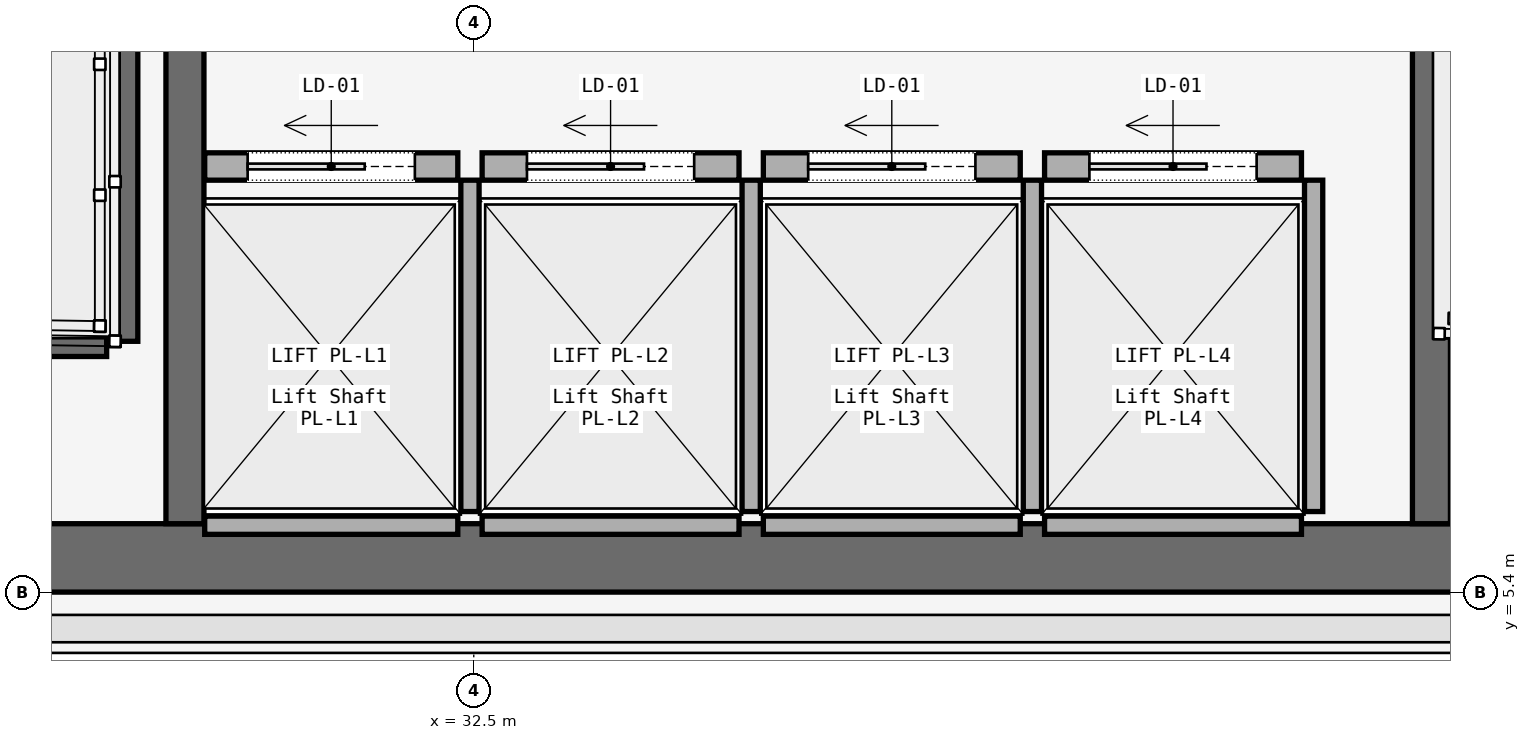
"""IFC4 building model, lengths in metres.
Left out: names, types, materials, properties, quantities, classifications, styles, units other than length and angle.
Written with IfcOpenShell. Run it as: python <this file> out.ifc"""

import sys

from ifc_helpers import new_model, si_unit, direction, frame, frame_2d, origin, place, context, subcontext, project, spatial, rectangle, extrude, element, fill, save


model = new_model("IFC4")
c1 = context("Model", 3, precision=1e-05, world=origin(), true_north=direction((0.0, 1.0)))
c2 = subcontext(c1, "Body", "Model", "MODEL_VIEW")
j1 = project(units=[si_unit("LENGTHUNIT", "METRE"), si_unit("PLANEANGLEUNIT", "RADIAN")], contexts=[c1])
p1 = place(None, origin())
s1 = spatial("IfcSite", under=j1, at=p1, CompositionType="ELEMENT")
p2 = place(p1, origin())
s2 = spatial("IfcBuilding", under=s1, at=p2, CompositionType="ELEMENT")
p3 = place(p2, frame((0.0, 0.0, 36.0)))
s3 = spatial("IfcBuildingStorey", under=s2, at=p3, CompositionType="ELEMENT", Elevation=36.0)
p4 = place(p3, frame((26.45, 5.625, 0.0), z_axis=(0.0, 0.0, 1.0), x_axis=(1.0, 0.0, 0.0)))
e1 = element("IfcWall", 1, at=p4, inside=s3, PredefinedType="SOLIDWALL", context=c2, shape_type="SweptSolid", body=[
    extrude(rectangle(XDim=31.1, YDim=0.45, at=frame_2d((15.55, 0.0))), origin(), (0.0, 0.0, 1.0), 3.58),
])
for number, where, z_axis, x_axis in (
    (2, (30.6, 5.85, 0.0), (0.0, 0.0, 1.0), (0.0, 1.0, 0.0)),
    (3, (38.8, 5.85, 0.0), (0.0, 0.0, 1.0), (0.0, 1.0, 0.0)),
):
    element("IfcWall", number, at=place(p3, frame(where, z_axis=z_axis, x_axis=x_axis)), inside=s3, PredefinedType="SOLIDWALL", context=c2, shape_type="SweptSolid", body=[
        extrude(rectangle(XDim=8.9, YDim=0.25, at=frame_2d((4.45, 0.0))), origin(), (0.0, 0.0, 1.0), 3.58),
    ])
p5 = place(p3, frame((30.19, 14.7, 0.0), z_axis=(0.0, 0.0, 1.0), x_axis=(0.0, -1.0, 0.0)))
e4 = element("IfcWall", 4, at=p5, inside=s3, PredefinedType="SOLIDWALL", context=c2, shape_type="SweptSolid", body=[
    extrude(rectangle(XDim=7.65, YDim=0.2, at=frame_2d((3.825, 0.0))), origin(), (0.0, 0.0, 1.0), 3.8),
])
p6 = place(p3, frame((26.97, 7.05, 0.0), z_axis=(0.0, 0.0, 1.0), x_axis=(1.0, 0.0, 0.0)))
e5 = element("IfcWall", 5, at=p6, inside=s3, PredefinedType="SOLIDWALL", context=c2, shape_type="SweptSolid", body=[
    extrude(rectangle(XDim=3.115, YDim=0.2, at=frame_2d((1.558, 0.0))), origin(), (0.0, 0.0, 1.0), 3.8),
])
p7 = place(p3, frame((30.73, 8.2, 0.0), z_axis=(0.0, 0.0, 1.0), x_axis=(1.0, 0.0, 0.0)))
e6 = element("IfcWall", 6, at=p7, inside=s3, PredefinedType="SOLIDWALL", context=c2, shape_type="SweptSolid", body=[
    extrude(rectangle(XDim=1.665, YDim=0.18, at=frame_2d((0.833, 0.0))), origin(), (0.0, 0.0, 1.0), 2.933),
])
p8 = place(p7, frame((0.282, 0.0, 0.0)))
e7 = element("IfcOpeningElement", 7, at=p8, cuts=e6, PredefinedType="OPENING", context=c2, shape_type="SweptSolid", body=[
    extrude(rectangle(XDim=1.1, YDim=2.2, at=frame_2d((0.55, 1.1))), frame((0.0, 0.09, 0.0), z_axis=(0.0, -1.0, 0.0), x_axis=(1.0, 0.0, 0.0)), (0.0, 0.0, 1.0), 0.18),
])
p9 = place(p3, frame((30.73, 5.84, 0.0), z_axis=(0.0, 0.0, 1.0), x_axis=(1.0, 0.0, 0.0)))
e8 = element("IfcWall", 8, at=p9, inside=s3, PredefinedType="SOLIDWALL", context=c2, shape_type="SweptSolid", body=[
    extrude(rectangle(XDim=1.665, YDim=0.12, at=frame_2d((0.833, 0.0))), origin(), (0.0, 0.0, 1.0), 2.933),
])
p10 = place(p3, frame((32.475, 5.93, 0.0), z_axis=(0.0, 0.0, 1.0), x_axis=(0.0, 1.0, 0.0)))
e9 = element("IfcWall", 9, at=p10, inside=s3, PredefinedType="SOLIDWALL", context=c2, shape_type="SweptSolid", body=[
    extrude(rectangle(XDim=2.18, YDim=0.12, at=frame_2d((1.09, 0.0))), origin(), (0.0, 0.0, 1.0), 2.933),
])
p11 = place(p3, frame((32.555, 8.2, 0.0), z_axis=(0.0, 0.0, 1.0), x_axis=(1.0, 0.0, 0.0)))
e10 = element("IfcWall", 10, at=p11, inside=s3, PredefinedType="SOLIDWALL", context=c2, shape_type="SweptSolid", body=[
    extrude(rectangle(XDim=1.69, YDim=0.18, at=frame_2d((0.845, 0.0))), origin(), (0.0, 0.0, 1.0), 2.933),
])
p12 = place(p11, frame((0.295, 0.0, 0.0)))
e11 = element("IfcOpeningElement", 11, at=p12, cuts=e10, PredefinedType="OPENING", context=c2, shape_type="SweptSolid", body=[
    extrude(rectangle(XDim=1.1, YDim=2.2, at=frame_2d((0.55, 1.1))), frame((0.0, 0.09, 0.0), z_axis=(0.0, -1.0, 0.0), x_axis=(1.0, 0.0, 0.0)), (0.0, 0.0, 1.0), 0.18),
])
p13 = place(p3, frame((32.555, 5.84, 0.0), z_axis=(0.0, 0.0, 1.0), x_axis=(1.0, 0.0, 0.0)))
e12 = element("IfcWall", 12, at=p13, inside=s3, PredefinedType="SOLIDWALL", context=c2, shape_type="SweptSolid", body=[
    extrude(rectangle(XDim=1.69, YDim=0.12, at=frame_2d((0.845, 0.0))), origin(), (0.0, 0.0, 1.0), 2.933),
])
p14 = place(p3, frame((34.325, 5.93, 0.0), z_axis=(0.0, 0.0, 1.0), x_axis=(0.0, 1.0, 0.0)))
e13 = element("IfcWall", 13, at=p14, inside=s3, PredefinedType="SOLIDWALL", context=c2, shape_type="SweptSolid", body=[
    extrude(rectangle(XDim=2.18, YDim=0.12, at=frame_2d((1.09, 0.0))), origin(), (0.0, 0.0, 1.0), 2.933),
])
p15 = place(p3, frame((34.405, 8.2, 0.0), z_axis=(0.0, 0.0, 1.0), x_axis=(1.0, 0.0, 0.0)))
e14 = element("IfcWall", 14, at=p15, inside=s3, PredefinedType="SOLIDWALL", context=c2, shape_type="SweptSolid", body=[
    extrude(rectangle(XDim=1.69, YDim=0.18, at=frame_2d((0.845, 0.0))), origin(), (0.0, 0.0, 1.0), 2.933),
])
p16 = place(p15, frame((0.295, 0.0, 0.0)))
e15 = element("IfcOpeningElement", 15, at=p16, cuts=e14, PredefinedType="OPENING", context=c2, shape_type="SweptSolid", body=[
    extrude(rectangle(XDim=1.1, YDim=2.2, at=frame_2d((0.55, 1.1))), frame((0.0, 0.09, 0.0), z_axis=(0.0, -1.0, 0.0), x_axis=(1.0, 0.0, 0.0)), (0.0, 0.0, 1.0), 0.18),
])
p17 = place(p3, frame((34.405, 5.84, 0.0), z_axis=(0.0, 0.0, 1.0), x_axis=(1.0, 0.0, 0.0)))
e16 = element("IfcWall", 16, at=p17, inside=s3, PredefinedType="SOLIDWALL", context=c2, shape_type="SweptSolid", body=[
    extrude(rectangle(XDim=1.69, YDim=0.12, at=frame_2d((0.845, 0.0))), origin(), (0.0, 0.0, 1.0), 2.933),
])
p18 = place(p3, frame((36.175, 5.93, 0.0), z_axis=(0.0, 0.0, 1.0), x_axis=(0.0, 1.0, 0.0)))
e17 = element("IfcWall", 17, at=p18, inside=s3, PredefinedType="SOLIDWALL", context=c2, shape_type="SweptSolid", body=[
    extrude(rectangle(XDim=2.18, YDim=0.12, at=frame_2d((1.09, 0.0))), origin(), (0.0, 0.0, 1.0), 2.933),
])
p19 = place(p3, frame((36.255, 8.2, 0.0), z_axis=(0.0, 0.0, 1.0), x_axis=(1.0, 0.0, 0.0)))
e18 = element("IfcWall", 18, at=p19, inside=s3, PredefinedType="SOLIDWALL", context=c2, shape_type="SweptSolid", body=[
    extrude(rectangle(XDim=1.69, YDim=0.18, at=frame_2d((0.845, 0.0))), origin(), (0.0, 0.0, 1.0), 2.933),
])
p20 = place(p19, frame((0.295, 0.0, 0.0)))
e19 = element("IfcOpeningElement", 19, at=p20, cuts=e18, PredefinedType="OPENING", context=c2, shape_type="SweptSolid", body=[
    extrude(rectangle(XDim=1.1, YDim=2.2, at=frame_2d((0.55, 1.1))), frame((0.0, 0.09, 0.0), z_axis=(0.0, -1.0, 0.0), x_axis=(1.0, 0.0, 0.0)), (0.0, 0.0, 1.0), 0.18),
])
p21 = place(p3, frame((36.255, 5.84, 0.0), z_axis=(0.0, 0.0, 1.0), x_axis=(1.0, 0.0, 0.0)))
e20 = element("IfcWall", 20, at=p21, inside=s3, PredefinedType="SOLIDWALL", context=c2, shape_type="SweptSolid", body=[
    extrude(rectangle(XDim=1.69, YDim=0.12, at=frame_2d((0.845, 0.0))), origin(), (0.0, 0.0, 1.0), 2.933),
])
p22 = place(p3, frame((38.025, 5.93, 0.0), z_axis=(0.0, 0.0, 1.0), x_axis=(0.0, 1.0, 0.0)))
e21 = element("IfcWall", 21, at=p22, inside=s3, PredefinedType="SOLIDWALL", context=c2, shape_type="SweptSolid", body=[
    extrude(rectangle(XDim=2.18, YDim=0.12, at=frame_2d((1.09, 0.0))), origin(), (0.0, 0.0, 1.0), 2.933),
])
p23 = place(p8, origin())
e22 = element("IfcDoor", 22, at=p23, inside=s3, OperationType="SLIDING_TO_LEFT", PredefinedType="DOOR", context=c2, shape_type="SweptSolid", body=[
    extrude(rectangle(XDim=1.1, YDim=2.2, at=frame_2d((0.55, 1.1))), frame((0.0, 0.025, 0.0), z_axis=(0.0, -1.0, 0.0), x_axis=(1.0, 0.0, 0.0)), (0.0, 0.0, 1.0), 0.05),
])
fill(e7, e22)
p24 = place(p12, origin())
e23 = element("IfcDoor", 23, at=p24, inside=s3, OperationType="SLIDING_TO_LEFT", PredefinedType="DOOR", context=c2, shape_type="SweptSolid", body=[
    extrude(rectangle(XDim=1.1, YDim=2.2, at=frame_2d((0.55, 1.1))), frame((0.0, 0.025, 0.0), z_axis=(0.0, -1.0, 0.0), x_axis=(1.0, 0.0, 0.0)), (0.0, 0.0, 1.0), 0.05),
])
fill(e11, e23)
p25 = place(p16, origin())
e24 = element("IfcDoor", 24, at=p25, inside=s3, OperationType="SLIDING_TO_LEFT", PredefinedType="DOOR", context=c2, shape_type="SweptSolid", body=[
    extrude(rectangle(XDim=1.1, YDim=2.2, at=frame_2d((0.55, 1.1))), frame((0.0, 0.025, 0.0), z_axis=(0.0, -1.0, 0.0), x_axis=(1.0, 0.0, 0.0)), (0.0, 0.0, 1.0), 0.05),
])
fill(e15, e24)
p26 = place(p20, origin())
e25 = element("IfcDoor", 25, at=p26, inside=s3, OperationType="SLIDING_TO_LEFT", PredefinedType="DOOR", context=c2, shape_type="SweptSolid", body=[
    extrude(rectangle(XDim=1.1, YDim=2.2, at=frame_2d((0.55, 1.1))), frame((0.0, 0.025, 0.0), z_axis=(0.0, -1.0, 0.0), x_axis=(1.0, 0.0, 0.0)), (0.0, 0.0, 1.0), 0.05),
])
fill(e19, e25)
save(model, sys.argv[1])
